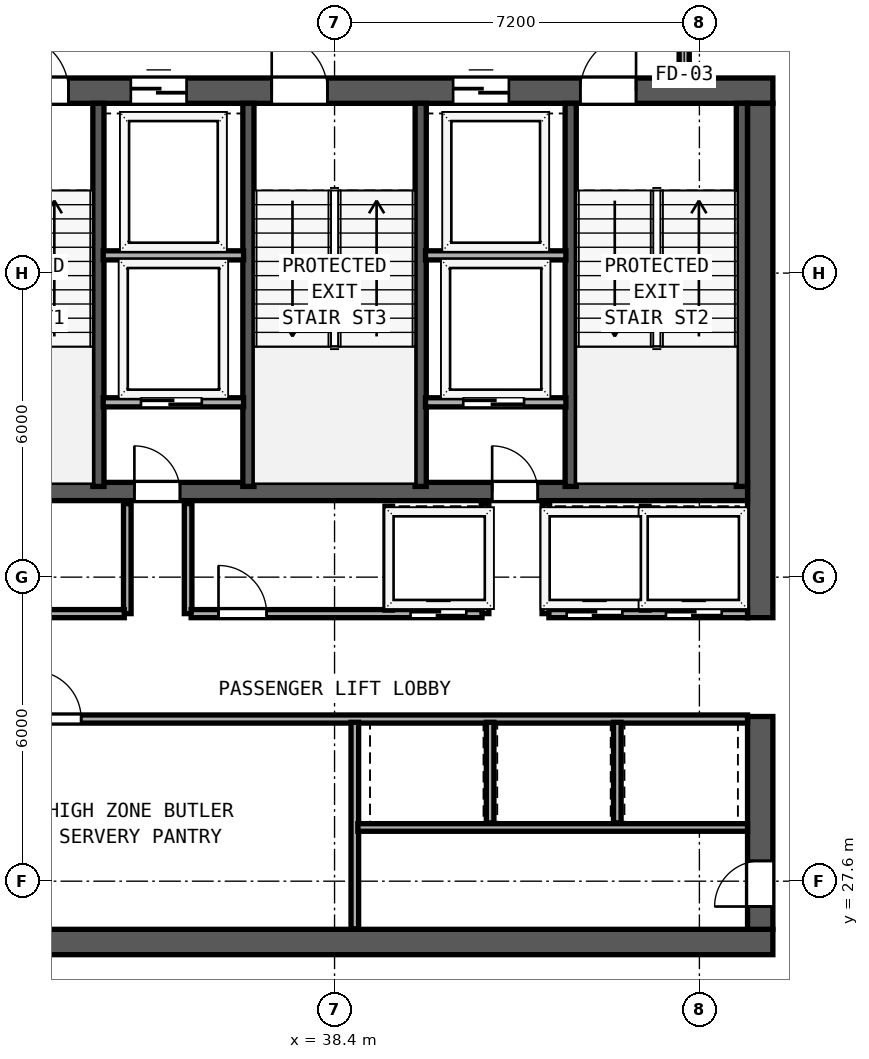
"""IFC4 building model, lengths in metres.
Left out: names, types, materials, properties, quantities, classifications, styles, units other than length and angle.
Written with IfcOpenShell. Run it as: python <this file> out.ifc"""

import sys

from ifc_helpers import new_model, si_unit, direction, frame, frame_2d, origin, place, context, subcontext, project, spatial, rectangle, extrude, element, fill, save


model = new_model("IFC4")
c1 = context("Model", 3, precision=1e-05, world=origin(), true_north=direction((0.0, 1.0)))
c2 = subcontext(c1, "Body", "Model", "MODEL_VIEW")
j1 = project(units=[si_unit("LENGTHUNIT", "METRE"), si_unit("PLANEANGLEUNIT", "RADIAN")], contexts=[c1])
p1 = place(None, origin())
s1 = spatial("IfcSite", under=j1, at=p1, CompositionType="ELEMENT")
p2 = place(p1, origin())
s2 = spatial("IfcBuilding", under=s1, at=p2, CompositionType="ELEMENT")
p3 = place(p2, frame((0.0, 0.0, 305.6)))
s3 = spatial("IfcBuildingStorey", under=s2, at=p3, CompositionType="ELEMENT", Elevation=305.6)
p4 = place(p3, frame((29.75, 26.4, 0.0), z_axis=(0.0, 0.0, 1.0), x_axis=(1.0, 0.0, 0.0)))
e1 = element("IfcWall", 1, at=p4, inside=s3, PredefinedType="SHEAR", context=c2, shape_type="SweptSolid", body=[
    extrude(rectangle(XDim=17.3, YDim=0.5, at=frame_2d((8.65, 0.0))), origin(), (0.0, 0.0, 1.0), 3.72),
])
p5 = place(p3, frame((29.75, 43.2, 0.0), z_axis=(0.0, 0.0, 1.0), x_axis=(1.0, 0.0, 0.0)))
e2 = element("IfcWall", 2, at=p5, inside=s3, PredefinedType="SHEAR", context=c2, shape_type="SweptSolid", body=[
    extrude(rectangle(XDim=17.3, YDim=0.5, at=frame_2d((8.65, 0.0))), origin(), (0.0, 0.0, 1.0), 3.72),
])
p6 = place(p5, frame((2.3, 0.0, 0.0)))
e3 = element("IfcOpeningElement", 3, at=p6, cuts=e2, PredefinedType="OPENING", context=c2, shape_type="SweptSolid", body=[
    extrude(rectangle(XDim=1.1, YDim=2.15, at=frame_2d((0.55, 1.075))), frame((0.0, 0.26, 0.0), z_axis=(0.0, -1.0, 0.0), x_axis=(1.0, 0.0, 0.0)), (0.0, 0.0, 1.0), 0.52),
])
p7 = place(p5, frame((7.41, 0.0, 0.0)))
e4 = element("IfcOpeningElement", 4, at=p7, cuts=e2, PredefinedType="OPENING", context=c2, shape_type="SweptSolid", body=[
    extrude(rectangle(XDim=1.1, YDim=2.15, at=frame_2d((0.55, 1.075))), frame((0.0, 0.26, 0.0), z_axis=(0.0, -1.0, 0.0), x_axis=(1.0, 0.0, 0.0)), (0.0, 0.0, 1.0), 0.52),
])
p8 = place(p5, frame((13.5, 0.0, 0.0)))
e5 = element("IfcOpeningElement", 5, at=p8, cuts=e2, PredefinedType="OPENING", context=c2, shape_type="SweptSolid", body=[
    extrude(rectangle(XDim=1.1, YDim=2.15, at=frame_2d((0.55, 1.075))), frame((0.0, 0.26, 0.0), z_axis=(0.0, -1.0, 0.0), x_axis=(1.0, 0.0, 0.0)), (0.0, 0.0, 1.0), 0.52),
])
p9 = place(p5, frame((4.63, 0.0, 0.0)))
e6 = element("IfcOpeningElement", 6, at=p9, cuts=e2, PredefinedType="OPENING", context=c2, shape_type="SweptSolid", body=[
    extrude(rectangle(XDim=1.1, YDim=2.2, at=frame_2d((0.55, 1.1))), frame((0.0, 0.26, 0.0), z_axis=(0.0, -1.0, 0.0), x_axis=(1.0, 0.0, 0.0)), (0.0, 0.0, 1.0), 0.52),
])
p10 = place(p5, frame((10.99, 0.0, 0.0)))
e7 = element("IfcOpeningElement", 7, at=p10, cuts=e2, PredefinedType="OPENING", context=c2, shape_type="SweptSolid", body=[
    extrude(rectangle(XDim=1.1, YDim=2.2, at=frame_2d((0.55, 1.1))), frame((0.0, 0.26, 0.0), z_axis=(0.0, -1.0, 0.0), x_axis=(1.0, 0.0, 0.0)), (0.0, 0.0, 1.0), 0.52),
])
p11 = place(p3, frame((46.8, 26.65, 0.0), z_axis=(0.0, 0.0, 1.0), x_axis=(0.0, 1.0, 0.0)))
e8 = element("IfcWall", 8, at=p11, inside=s3, PredefinedType="SHEAR", context=c2, shape_type="SweptSolid", body=[
    extrude(rectangle(XDim=4.2, YDim=0.5, at=frame_2d((2.1, 0.0))), origin(), (0.0, 0.0, 1.0), 3.72),
])
p12 = place(p11, frame((1.35, 0.0, 0.0), z_axis=(0.0, 0.0, 1.0), x_axis=(-1.0, 0.0, 0.0)))
e9 = element("IfcOpeningElement", 9, at=p12, cuts=e8, PredefinedType="OPENING", context=c2, shape_type="SweptSolid", body=[
    extrude(rectangle(XDim=0.9, YDim=2.1, at=frame_2d((0.45, 1.05))), frame((0.0, 0.26, 0.0), z_axis=(0.0, -1.0, 0.0), x_axis=(1.0, 0.0, 0.0)), (0.0, 0.0, 1.0), 0.52),
])
p13 = place(p3, frame((46.8, 32.8, 0.0), z_axis=(0.0, 0.0, 1.0), x_axis=(0.0, 1.0, 0.0)))
e10 = element("IfcWall", 10, at=p13, inside=s3, PredefinedType="SHEAR", context=c2, shape_type="SweptSolid", body=[
    extrude(rectangle(XDim=10.15, YDim=0.5, at=frame_2d((5.075, 0.0))), origin(), (0.0, 0.0, 1.0), 3.72),
])
p14 = place(p3, frame((30.25, 35.29, 0.0), z_axis=(0.0, 0.0, 1.0), x_axis=(1.0, 0.0, 0.0)))
e11 = element("IfcWall", 11, at=p14, inside=s3, PredefinedType="SHEAR", context=c2, shape_type="SweptSolid", body=[
    extrude(rectangle(XDim=16.3, YDim=0.36, at=frame_2d((8.15, 0.0))), origin(), (0.0, 0.0, 1.0), 3.72),
])
p15 = place(p14, frame((5.1, 0.0, 0.0), z_axis=(0.0, 0.0, 1.0), x_axis=(-1.0, 0.0, 0.0)))
e12 = element("IfcOpeningElement", 12, at=p15, cuts=e11, PredefinedType="OPENING", context=c2, shape_type="SweptSolid", body=[
    extrude(rectangle(XDim=0.9, YDim=2.1, at=frame_2d((0.45, 1.05))), frame((0.0, 0.19, 0.0), z_axis=(0.0, -1.0, 0.0), x_axis=(1.0, 0.0, 0.0)), (0.0, 0.0, 1.0), 0.38),
])
p16 = place(p14, frame((12.16, 0.0, 0.0), z_axis=(0.0, 0.0, 1.0), x_axis=(-1.0, 0.0, 0.0)))
e13 = element("IfcOpeningElement", 13, at=p16, cuts=e11, PredefinedType="OPENING", context=c2, shape_type="SweptSolid", body=[
    extrude(rectangle(XDim=0.9, YDim=2.1, at=frame_2d((0.45, 1.05))), frame((0.0, 0.19, 0.0), z_axis=(0.0, -1.0, 0.0), x_axis=(1.0, 0.0, 0.0)), (0.0, 0.0, 1.0), 0.38),
])
for number, where, z_axis, x_axis in (
    (14, (33.74, 35.39, 0.0), (0.0, 0.0, 1.0), (0.0, 1.0, 0.0)),
    (15, (36.7, 35.39, 0.0), (0.0, 0.0, 1.0), (0.0, 1.0, 0.0)),
    (16, (40.1, 35.39, 0.0), (0.0, 0.0, 1.0), (0.0, 1.0, 0.0)),
    (17, (43.06, 35.39, 0.0), (0.0, 0.0, 1.0), (0.0, 1.0, 0.0)),
    (18, (46.438, 35.39, 0.0), (0.0, 0.0, 1.0), (0.0, 1.0, 0.0)),
):
    element("IfcWall", number, at=place(p3, frame(where, z_axis=z_axis, x_axis=x_axis)), inside=s3, PredefinedType="SHEAR", context=c2, shape_type="SweptSolid", body=[
        extrude(rectangle(XDim=7.56, YDim=0.22, at=frame_2d((3.78, 0.0))), origin(), (0.0, 0.0, 1.0), 3.72),
    ])
p17 = place(p3, frame((45.3, 43.45, 0.0), z_axis=(0.0, 0.0, 1.0), x_axis=(0.0, 1.0, 0.0)))
e19 = element("IfcWall", 19, at=p17, inside=s3, PredefinedType="SOLIDWALL", context=c2, shape_type="SweptSolid", body=[
    extrude(rectangle(XDim=2.445, YDim=0.2, at=frame_2d((1.223, 0.0))), origin(), (0.0, 0.0, 1.0), 3.72),
])
p18 = place(p17, frame((0.7, 0.0, 0.0)))
e20 = element("IfcOpeningElement", 20, at=p18, cuts=e19, PredefinedType="OPENING", context=c2, shape_type="SweptSolid", body=[
    extrude(rectangle(XDim=1.1, YDim=2.15, at=frame_2d((0.55, 1.075))), frame((0.0, 0.11, 0.0), z_axis=(0.0, -1.0, 0.0), x_axis=(1.0, 0.0, 0.0)), (0.0, 0.0, 1.0), 0.22),
])
for number, where, z_axis, x_axis in (
    (21, (33.835, 39.95, 0.0), (0.0, 0.0, 1.0), (1.0, 0.0, 0.0)),
    (22, (40.195, 39.95, 0.0), (0.0, 0.0, 1.0), (1.0, 0.0, 0.0)),
):
    element("IfcWall", number, at=place(p3, frame(where, z_axis=z_axis, x_axis=x_axis)), inside=s3, PredefinedType="SOLIDWALL", context=c2, shape_type="SweptSolid", body=[
        extrude(rectangle(XDim=2.77, YDim=0.18, at=frame_2d((1.385, 0.0))), origin(), (0.0, 0.0, 1.0), 3.72),
    ])
p19 = place(p3, frame((33.835, 37.05, 0.0), z_axis=(0.0, 0.0, 1.0), x_axis=(1.0, 0.0, 0.0)))
e23 = element("IfcWall", 23, at=p19, inside=s3, PredefinedType="SOLIDWALL", context=c2, shape_type="SweptSolid", body=[
    extrude(rectangle(XDim=2.77, YDim=0.18, at=frame_2d((1.385, 0.0))), origin(), (0.0, 0.0, 1.0), 3.72),
])
p20 = place(p19, frame((1.945, 0.0, 0.0), z_axis=(0.0, 0.0, 1.0), x_axis=(-1.0, 0.0, 0.0)))
e24 = element("IfcOpeningElement", 24, at=p20, cuts=e23, PredefinedType="OPENING", context=c2, shape_type="SweptSolid", body=[
    extrude(rectangle(XDim=1.2, YDim=2.2, at=frame_2d((0.6, 1.1))), frame((0.0, 0.1, 0.0), z_axis=(0.0, -1.0, 0.0), x_axis=(1.0, 0.0, 0.0)), (0.0, 0.0, 1.0), 0.2),
])
for number, where, z_axis, x_axis in (
    (25, (34.31, 32.88, 0.0), (0.0, 0.0, 1.0), (0.0, 1.0, 0.0)),
    (26, (35.51, 32.88, 0.0), (0.0, 0.0, 1.0), (0.0, 1.0, 0.0)),
):
    element("IfcWall", number, at=place(p3, frame(where, z_axis=z_axis, x_axis=x_axis)), inside=s3, PredefinedType="SOLIDWALL", context=c2, shape_type="SweptSolid", body=[
        extrude(rectangle(XDim=2.17, YDim=0.15, at=frame_2d((1.085, 0.0))), origin(), (0.0, 0.0, 1.0), 3.72),
    ])
p21 = place(p3, frame((40.195, 37.05, 0.0), z_axis=(0.0, 0.0, 1.0), x_axis=(1.0, 0.0, 0.0)))
e27 = element("IfcWall", 27, at=p21, inside=s3, PredefinedType="SOLIDWALL", context=c2, shape_type="SweptSolid", body=[
    extrude(rectangle(XDim=2.77, YDim=0.18, at=frame_2d((1.385, 0.0))), origin(), (0.0, 0.0, 1.0), 3.72),
])
p22 = place(p21, frame((1.945, 0.0, 0.0), z_axis=(0.0, 0.0, 1.0), x_axis=(-1.0, 0.0, 0.0)))
e28 = element("IfcOpeningElement", 28, at=p22, cuts=e27, PredefinedType="OPENING", context=c2, shape_type="SweptSolid", body=[
    extrude(rectangle(XDim=1.2, YDim=2.2, at=frame_2d((0.6, 1.1))), frame((0.0, 0.1, 0.0), z_axis=(0.0, -1.0, 0.0), x_axis=(1.0, 0.0, 0.0)), (0.0, 0.0, 1.0), 0.2),
])
for number, where, z_axis, x_axis in (
    (29, (41.37, 32.88, 0.0), (0.0, 0.0, 1.0), (0.0, 1.0, 0.0)),
    (30, (42.57, 32.88, 0.0), (0.0, 0.0, 1.0), (0.0, 1.0, 0.0)),
):
    element("IfcWall", number, at=place(p3, frame(where, z_axis=z_axis, x_axis=x_axis)), inside=s3, PredefinedType="SOLIDWALL", context=c2, shape_type="SweptSolid", body=[
        extrude(rectangle(XDim=2.17, YDim=0.15, at=frame_2d((1.085, 0.0))), origin(), (0.0, 0.0, 1.0), 3.72),
    ])
p23 = place(p3, frame((30.25, 32.88, 0.0), z_axis=(0.0, 0.0, 1.0), x_axis=(1.0, 0.0, 0.0)))
e31 = element("IfcWall", 31, at=p23, inside=s3, PredefinedType="SOLIDWALL", context=c2, shape_type="SweptSolid", body=[
    extrude(rectangle(XDim=4.0, YDim=0.16, at=frame_2d((2.0, 0.0))), origin(), (0.0, 0.0, 1.0), 3.72),
])
p24 = place(p23, frame((2.2, 0.0, 0.0), z_axis=(0.0, 0.0, 1.0), x_axis=(-1.0, 0.0, 0.0)))
e32 = element("IfcOpeningElement", 32, at=p24, cuts=e31, PredefinedType="OPENING", context=c2, shape_type="SweptSolid", body=[
    extrude(rectangle(XDim=0.95, YDim=2.12, at=frame_2d((0.475, 1.06))), frame((0.0, 0.09, 0.0), z_axis=(0.0, -1.0, 0.0), x_axis=(1.0, 0.0, 0.0)), (0.0, 0.0, 1.0), 0.18),
])
p25 = place(p3, frame((35.57, 32.88, 0.0), z_axis=(0.0, 0.0, 1.0), x_axis=(1.0, 0.0, 0.0)))
e33 = element("IfcWall", 33, at=p25, inside=s3, PredefinedType="SOLIDWALL", context=c2, shape_type="SweptSolid", body=[
    extrude(rectangle(XDim=5.74, YDim=0.16, at=frame_2d((2.87, 0.0))), origin(), (0.0, 0.0, 1.0), 3.72),
])
p26 = place(p25, frame((1.49, 0.0, 0.0), z_axis=(0.0, 0.0, 1.0), x_axis=(-1.0, 0.0, 0.0)))
e34 = element("IfcOpeningElement", 34, at=p26, cuts=e33, PredefinedType="OPENING", context=c2, shape_type="SweptSolid", body=[
    extrude(rectangle(XDim=0.95, YDim=2.12, at=frame_2d((0.475, 1.06))), frame((0.0, 0.09, 0.0), z_axis=(0.0, -1.0, 0.0), x_axis=(1.0, 0.0, 0.0)), (0.0, 0.0, 1.0), 0.18),
])
p27 = place(p25, frame((5.43, 0.0, 0.0), z_axis=(0.0, 0.0, 1.0), x_axis=(-1.0, 0.0, 0.0)))
e35 = element("IfcOpeningElement", 35, at=p27, cuts=e33, PredefinedType="OPENING", context=c2, shape_type="SweptSolid", body=[
    extrude(rectangle(XDim=1.1, YDim=2.2, at=frame_2d((0.55, 1.1))), frame((0.0, 0.09, 0.0), z_axis=(0.0, -1.0, 0.0), x_axis=(1.0, 0.0, 0.0)), (0.0, 0.0, 1.0), 0.18),
])
p28 = place(p3, frame((42.63, 32.88, 0.0), z_axis=(0.0, 0.0, 1.0), x_axis=(1.0, 0.0, 0.0)))
e36 = element("IfcWall", 36, at=p28, inside=s3, PredefinedType="SOLIDWALL", context=c2, shape_type="SweptSolid", body=[
    extrude(rectangle(XDim=3.92, YDim=0.16, at=frame_2d((1.96, 0.0))), origin(), (0.0, 0.0, 1.0), 3.72),
])
p29 = place(p28, frame((1.45, 0.0, 0.0), z_axis=(0.0, 0.0, 1.0), x_axis=(-1.0, 0.0, 0.0)))
e37 = element("IfcOpeningElement", 37, at=p29, cuts=e36, PredefinedType="OPENING", context=c2, shape_type="SweptSolid", body=[
    extrude(rectangle(XDim=1.1, YDim=2.2, at=frame_2d((0.55, 1.1))), frame((0.0, 0.09, 0.0), z_axis=(0.0, -1.0, 0.0), x_axis=(1.0, 0.0, 0.0)), (0.0, 0.0, 1.0), 0.18),
])
p30 = place(p28, frame((3.41, 0.0, 0.0), z_axis=(0.0, 0.0, 1.0), x_axis=(-1.0, 0.0, 0.0)))
e38 = element("IfcOpeningElement", 38, at=p30, cuts=e36, PredefinedType="OPENING", context=c2, shape_type="SweptSolid", body=[
    extrude(rectangle(XDim=1.1, YDim=2.2, at=frame_2d((0.55, 1.1))), frame((0.0, 0.09, 0.0), z_axis=(0.0, -1.0, 0.0), x_axis=(1.0, 0.0, 0.0)), (0.0, 0.0, 1.0), 0.18),
])
for number, where, z_axis, x_axis in (
    (39, (39.47, 32.95, 0.0), (0.0, 0.0, 1.0), (0.0, 1.0, 0.0)),
    (40, (44.53, 32.95, 0.0), (0.0, 0.0, 1.0), (0.0, 1.0, 0.0)),
):
    element("IfcWall", number, at=place(p3, frame(where, z_axis=z_axis, x_axis=x_axis)), inside=s3, PredefinedType="SOLIDWALL", context=c2, shape_type="SweptSolid", body=[
        extrude(rectangle(XDim=2.05, YDim=0.15, at=frame_2d((1.025, 0.0))), origin(), (0.0, 0.0, 1.0), 3.72),
    ])
p31 = place(p3, frame((30.25, 30.8, 0.0), z_axis=(0.0, 0.0, 1.0), x_axis=(1.0, 0.0, 0.0)))
e41 = element("IfcWall", 41, at=p31, inside=s3, PredefinedType="SOLIDWALL", context=c2, shape_type="SweptSolid", body=[
    extrude(rectangle(XDim=16.3, YDim=0.16, at=frame_2d((8.15, 0.0))), origin(), (0.0, 0.0, 1.0), 3.72),
])
p32 = place(p31, frame((2.2, 0.0, 0.0)))
e42 = element("IfcOpeningElement", 42, at=p32, cuts=e41, PredefinedType="OPENING", context=c2, shape_type="SweptSolid", body=[
    extrude(rectangle(XDim=0.95, YDim=2.12, at=frame_2d((0.475, 1.06))), frame((0.0, 0.09, 0.0), z_axis=(0.0, -1.0, 0.0), x_axis=(1.0, 0.0, 0.0)), (0.0, 0.0, 1.0), 0.18),
])
p33 = place(p3, frame((38.8, 26.66, 0.0), z_axis=(0.0, 0.0, 1.0), x_axis=(0.0, 1.0, 0.0)))
e43 = element("IfcWall", 43, at=p33, inside=s3, PredefinedType="SOLIDWALL", context=c2, shape_type="SweptSolid", body=[
    extrude(rectangle(XDim=4.075, YDim=0.15, at=frame_2d((2.038, 0.0))), origin(), (0.0, 0.0, 1.0), 3.72),
])
p34 = place(p3, frame((38.86, 28.66, 0.0), z_axis=(0.0, 0.0, 1.0), x_axis=(1.0, 0.0, 0.0)))
e44 = element("IfcWall", 44, at=p34, inside=s3, PredefinedType="PARTITIONING", context=c2, shape_type="SweptSolid", body=[
    extrude(rectangle(XDim=7.69, YDim=0.15, at=frame_2d((3.845, 0.0))), origin(), (0.0, 0.0, 1.0), 3.72),
])
for number, where, z_axis, x_axis in (
    (45, (41.47, 28.75, 0.0), (0.0, 0.0, 1.0), (0.0, 1.0, 0.0)),
    (46, (43.98, 28.75, 0.0), (0.0, 0.0, 1.0), (0.0, 1.0, 0.0)),
):
    element("IfcWall", number, at=place(p3, frame(where, z_axis=z_axis, x_axis=x_axis)), inside=s3, PredefinedType="SOLIDWALL", context=c2, shape_type="SweptSolid", body=[
        extrude(rectangle(XDim=1.985, YDim=0.15, at=frame_2d((0.993, 0.0))), origin(), (0.0, 0.0, 1.0), 3.72),
    ])
p35 = place(p6, origin())
e47 = element("IfcDoor", 47, at=p35, inside=s3, OperationType="SINGLE_SWING_LEFT", PredefinedType="DOOR", context=c2, shape_type="SweptSolid", body=[
    extrude(rectangle(XDim=1.1, YDim=2.15, at=frame_2d((0.55, 1.075))), frame((0.0, 0.185, 0.0), z_axis=(0.0, -1.0, 0.0), x_axis=(1.0, 0.0, 0.0)), (0.0, 0.0, 1.0), 0.05),
])
fill(e3, e47)
p36 = place(p7, origin())
e48 = element("IfcDoor", 48, at=p36, inside=s3, OperationType="SINGLE_SWING_LEFT", PredefinedType="DOOR", context=c2, shape_type="SweptSolid", body=[
    extrude(rectangle(XDim=1.1, YDim=2.15, at=frame_2d((0.55, 1.075))), frame((0.0, 0.185, 0.0), z_axis=(0.0, -1.0, 0.0), x_axis=(1.0, 0.0, 0.0)), (0.0, 0.0, 1.0), 0.05),
])
fill(e4, e48)
p37 = place(p8, origin())
e49 = element("IfcDoor", 49, at=p37, inside=s3, OperationType="SINGLE_SWING_RIGHT", PredefinedType="DOOR", context=c2, shape_type="SweptSolid", body=[
    extrude(rectangle(XDim=1.1, YDim=2.15, at=frame_2d((0.55, 1.075))), frame((0.0, 0.185, 0.0), z_axis=(0.0, -1.0, 0.0), x_axis=(1.0, 0.0, 0.0)), (0.0, 0.0, 1.0), 0.05),
])
fill(e5, e49)
p38 = place(p9, origin())
e50 = element("IfcDoor", 50, at=p38, inside=s3, OperationType="SLIDING_TO_LEFT", PredefinedType="DOOR", context=c2, shape_type="SweptSolid", body=[
    extrude(rectangle(XDim=1.1, YDim=2.2, at=frame_2d((0.55, 1.1))), frame((0.0, 0.185, 0.0), z_axis=(0.0, -1.0, 0.0), x_axis=(1.0, 0.0, 0.0)), (0.0, 0.0, 1.0), 0.05),
])
fill(e6, e50)
p39 = place(p10, origin())
e51 = element("IfcDoor", 51, at=p39, inside=s3, OperationType="SLIDING_TO_LEFT", PredefinedType="DOOR", context=c2, shape_type="SweptSolid", body=[
    extrude(rectangle(XDim=1.1, YDim=2.2, at=frame_2d((0.55, 1.1))), frame((0.0, 0.185, 0.0), z_axis=(0.0, -1.0, 0.0), x_axis=(1.0, 0.0, 0.0)), (0.0, 0.0, 1.0), 0.05),
])
fill(e7, e51)
p40 = place(p20, origin())
e52 = element("IfcDoor", 52, at=p40, inside=s3, OperationType="SLIDING_TO_RIGHT", PredefinedType="DOOR", context=c2, shape_type="SweptSolid", body=[
    extrude(rectangle(XDim=1.2, YDim=2.2, at=frame_2d((0.6, 1.1))), frame((0.0, 0.025, 0.0), z_axis=(0.0, -1.0, 0.0), x_axis=(1.0, 0.0, 0.0)), (0.0, 0.0, 1.0), 0.05),
])
fill(e24, e52)
p41 = place(p15, origin())
e53 = element("IfcDoor", 53, at=p41, inside=s3, OperationType="SINGLE_SWING_RIGHT", PredefinedType="DOOR", context=c2, shape_type="SweptSolid", body=[
    extrude(rectangle(XDim=0.9, YDim=2.1, at=frame_2d((0.45, 1.05))), frame((0.0, 0.025, 0.0), z_axis=(0.0, -1.0, 0.0), x_axis=(1.0, 0.0, 0.0)), (0.0, 0.0, 1.0), 0.05),
])
fill(e12, e53)
p42 = place(p22, origin())
e54 = element("IfcDoor", 54, at=p42, inside=s3, OperationType="SLIDING_TO_RIGHT", PredefinedType="DOOR", context=c2, shape_type="SweptSolid", body=[
    extrude(rectangle(XDim=1.2, YDim=2.2, at=frame_2d((0.6, 1.1))), frame((0.0, 0.025, 0.0), z_axis=(0.0, -1.0, 0.0), x_axis=(1.0, 0.0, 0.0)), (0.0, 0.0, 1.0), 0.05),
])
fill(e28, e54)
p43 = place(p16, origin())
e55 = element("IfcDoor", 55, at=p43, inside=s3, OperationType="SINGLE_SWING_RIGHT", PredefinedType="DOOR", context=c2, shape_type="SweptSolid", body=[
    extrude(rectangle(XDim=0.9, YDim=2.1, at=frame_2d((0.45, 1.05))), frame((0.0, 0.025, 0.0), z_axis=(0.0, -1.0, 0.0), x_axis=(1.0, 0.0, 0.0)), (0.0, 0.0, 1.0), 0.05),
])
fill(e13, e55)
p44 = place(p26, origin())
e56 = element("IfcDoor", 56, at=p44, inside=s3, OperationType="SINGLE_SWING_RIGHT", PredefinedType="DOOR", context=c2, shape_type="SweptSolid", body=[
    extrude(rectangle(XDim=0.95, YDim=2.12, at=frame_2d((0.475, 1.06))), frame((0.0, 0.025, 0.0), z_axis=(0.0, -1.0, 0.0), x_axis=(1.0, 0.0, 0.0)), (0.0, 0.0, 1.0), 0.05),
])
fill(e34, e56)
p45 = place(p27, origin())
e57 = element("IfcDoor", 57, at=p45, inside=s3, OperationType="SLIDING_TO_RIGHT", PredefinedType="DOOR", context=c2, shape_type="SweptSolid", body=[
    extrude(rectangle(XDim=1.1, YDim=2.2, at=frame_2d((0.55, 1.1))), frame((0.0, 0.025, 0.0), z_axis=(0.0, -1.0, 0.0), x_axis=(1.0, 0.0, 0.0)), (0.0, 0.0, 1.0), 0.05),
])
fill(e35, e57)
p46 = place(p29, origin())
e58 = element("IfcDoor", 58, at=p46, inside=s3, OperationType="SLIDING_TO_RIGHT", PredefinedType="DOOR", context=c2, shape_type="SweptSolid", body=[
    extrude(rectangle(XDim=1.1, YDim=2.2, at=frame_2d((0.55, 1.1))), frame((0.0, 0.025, 0.0), z_axis=(0.0, -1.0, 0.0), x_axis=(1.0, 0.0, 0.0)), (0.0, 0.0, 1.0), 0.05),
])
fill(e37, e58)
p47 = place(p30, origin())
e59 = element("IfcDoor", 59, at=p47, inside=s3, OperationType="SLIDING_TO_RIGHT", PredefinedType="DOOR", context=c2, shape_type="SweptSolid", body=[
    extrude(rectangle(XDim=1.1, YDim=2.2, at=frame_2d((0.55, 1.1))), frame((0.0, 0.025, 0.0), z_axis=(0.0, -1.0, 0.0), x_axis=(1.0, 0.0, 0.0)), (0.0, 0.0, 1.0), 0.05),
])
fill(e38, e59)
p48 = place(p32, origin())
e60 = element("IfcDoor", 60, at=p48, inside=s3, OperationType="SINGLE_SWING_LEFT", PredefinedType="DOOR", context=c2, shape_type="SweptSolid", body=[
    extrude(rectangle(XDim=0.95, YDim=2.12, at=frame_2d((0.475, 1.06))), frame((0.0, 0.025, 0.0), z_axis=(0.0, -1.0, 0.0), x_axis=(1.0, 0.0, 0.0)), (0.0, 0.0, 1.0), 0.05),
])
fill(e42, e60)
p49 = place(p12, origin())
e61 = element("IfcDoor", 61, at=p49, inside=s3, OperationType="SINGLE_SWING_RIGHT", PredefinedType="DOOR", context=c2, shape_type="SweptSolid", body=[
    extrude(rectangle(XDim=0.9, YDim=2.1, at=frame_2d((0.45, 1.05))), frame((0.0, -0.135, 0.0), z_axis=(0.0, -1.0, 0.0), x_axis=(1.0, 0.0, 0.0)), (0.0, 0.0, 1.0), 0.05),
])
fill(e9, e61)
save(model, sys.argv[1])
